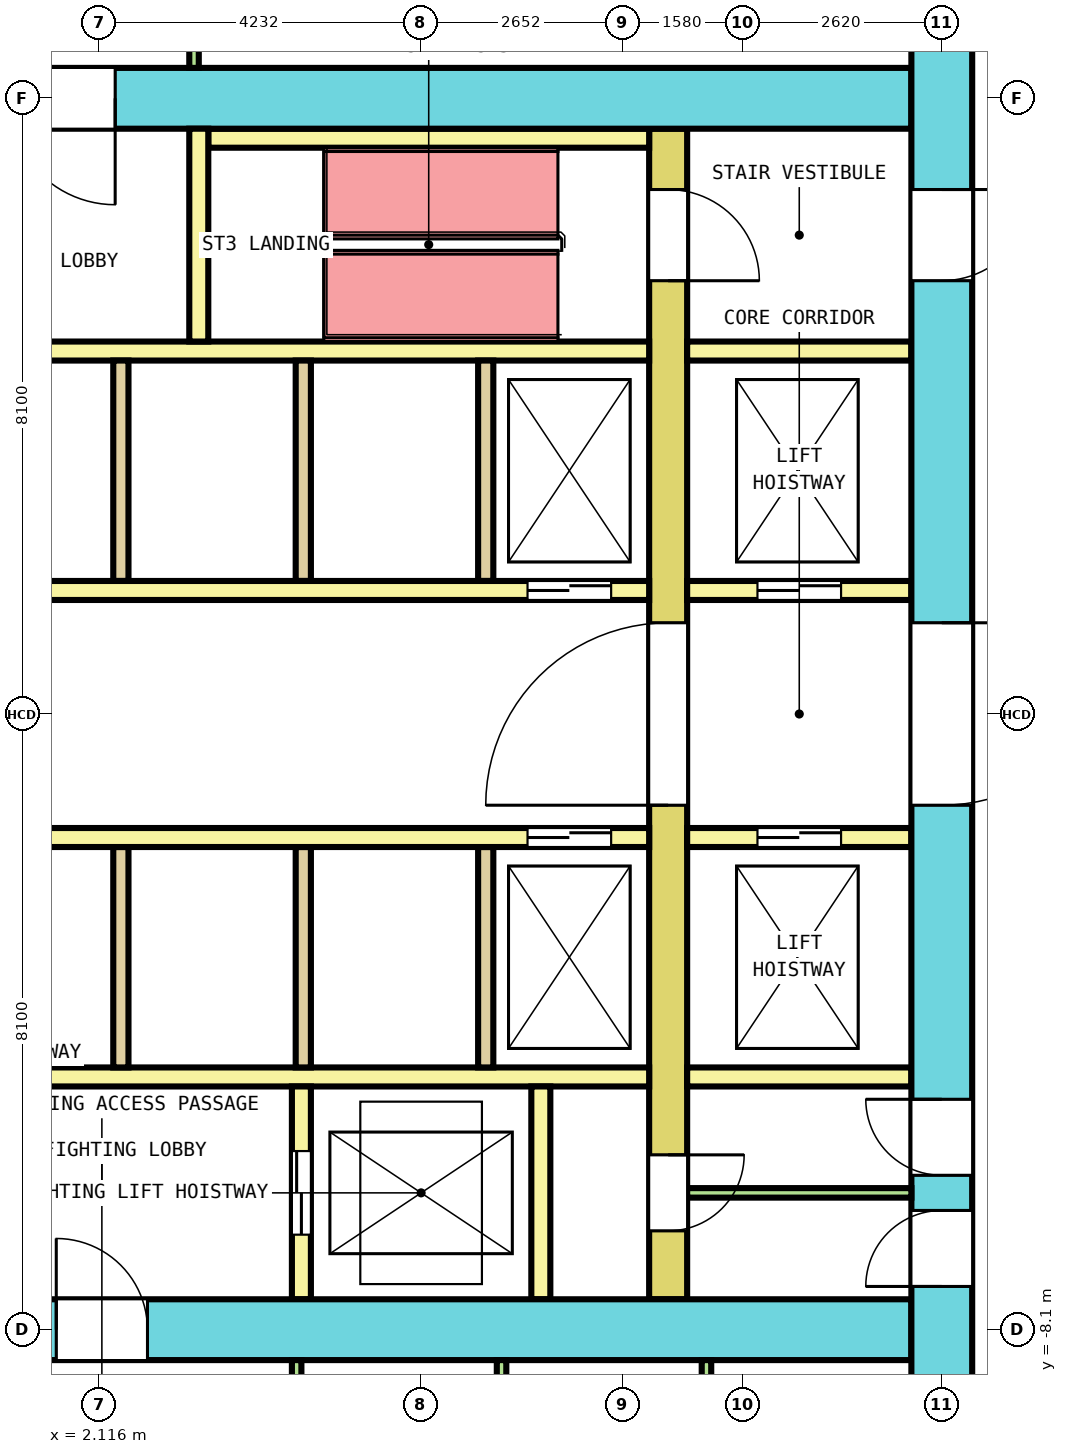
"""IFC4 building model, lengths in metres.
Left out: names, types, materials, properties, quantities, classifications, styles, units other than length and angle.
Written with IfcOpenShell. Run it as: python <this file> out.ifc"""

import sys

from ifc_helpers import new_model, si_unit, direction, frame, frame_2d, origin, place, context, subcontext, project, spatial, rectangle, extrude, element, fill, save


model = new_model("IFC4")
c1 = context("Model", 3, precision=1e-05, world=origin(), true_north=direction((0.0, 1.0)))
c2 = subcontext(c1, "Body", "Model", "MODEL_VIEW")
j1 = project(units=[si_unit("LENGTHUNIT", "METRE"), si_unit("PLANEANGLEUNIT", "RADIAN")], contexts=[c1])
p1 = place(None, origin())
s1 = spatial("IfcSite", under=j1, at=p1, CompositionType="ELEMENT")
p2 = place(p1, origin())
s2 = spatial("IfcBuilding", under=s1, at=p2, CompositionType="ELEMENT")
p3 = place(p2, frame((0.0, 0.0, 80.8)))
s3 = spatial("IfcBuildingStorey", under=s2, at=p3, CompositionType="ELEMENT", Elevation=80.8)
p4 = place(p3, frame((13.2, -10.4, 0.0), z_axis=(0.0, 0.0, 1.0), x_axis=(0.0, 1.0, 0.0)))
e1 = element("IfcWall", 1, at=p4, inside=s3, PredefinedType="SHEAR", context=c2, shape_type="SweptSolid", body=[
    extrude(rectangle(XDim=20.8, YDim=0.8, at=frame_2d((10.4, 0.0))), origin(), (0.0, 0.0, 1.0), 4.1),
])
p5 = place(p4, frame((9.2, 0.0, 0.0)))
e2 = element("IfcOpeningElement", 2, at=p5, cuts=e1, PredefinedType="OPENING", context=c2, shape_type="SweptSolid", body=[
    extrude(rectangle(XDim=2.4, YDim=2.1, at=frame_2d((1.2, 1.05))), frame((0.0, 0.41, 0.0), z_axis=(0.0, -1.0, 0.0), x_axis=(1.0, 0.0, 0.0)), (0.0, 0.0, 1.0), 0.82),
])
p6 = place(p4, frame((16.1, 0.0, 0.0)))
e3 = element("IfcOpeningElement", 3, at=p6, cuts=e1, PredefinedType="OPENING", context=c2, shape_type="SweptSolid", body=[
    extrude(rectangle(XDim=1.2, YDim=2.1, at=frame_2d((0.6, 1.05))), frame((0.0, 0.41, 0.0), z_axis=(0.0, -1.0, 0.0), x_axis=(1.0, 0.0, 0.0)), (0.0, 0.0, 1.0), 0.82),
])
p7 = place(p4, frame((2.869, 0.0, 0.0)))
e4 = element("IfcOpeningElement", 4, at=p7, cuts=e1, PredefinedType="OPENING", context=c2, shape_type="SweptSolid", body=[
    extrude(rectangle(XDim=1.0, YDim=2.1, at=frame_2d((0.5, 1.05))), frame((0.0, 0.41, 0.0), z_axis=(0.0, -1.0, 0.0), x_axis=(1.0, 0.0, 0.0)), (0.0, 0.0, 1.0), 0.82),
])
p8 = place(p4, frame((4.331, 0.0, 0.0)))
e5 = element("IfcOpeningElement", 5, at=p8, cuts=e1, PredefinedType="OPENING", context=c2, shape_type="SweptSolid", body=[
    extrude(rectangle(XDim=1.0, YDim=2.1, at=frame_2d((0.5, 1.05))), frame((0.0, 0.41, 0.0), z_axis=(0.0, -1.0, 0.0), x_axis=(1.0, 0.0, 0.0)), (0.0, 0.0, 1.0), 0.82),
])
p9 = place(p3, frame((-12.8, 8.1, 0.0), z_axis=(0.0, 0.0, 1.0), x_axis=(1.0, 0.0, 0.0)))
e6 = element("IfcWall", 6, at=p9, inside=s3, PredefinedType="SHEAR", context=c2, shape_type="SweptSolid", body=[
    extrude(rectangle(XDim=25.6, YDim=0.8, at=frame_2d((12.8, 0.0))), origin(), (0.0, 0.0, 1.0), 4.1),
])
p10 = place(p9, frame((13.725, 0.0, 0.0)))
e7 = element("IfcOpeningElement", 7, at=p10, cuts=e6, PredefinedType="OPENING", context=c2, shape_type="SweptSolid", body=[
    extrude(rectangle(XDim=1.4, YDim=2.1, at=frame_2d((0.7, 1.05))), frame((0.0, 0.41, 0.0), z_axis=(0.0, -1.0, 0.0), x_axis=(1.0, 0.0, 0.0)), (0.0, 0.0, 1.0), 0.82),
])
p11 = place(p3, frame((-12.8, -8.1, 0.0), z_axis=(0.0, 0.0, 1.0), x_axis=(1.0, 0.0, 0.0)))
e8 = element("IfcWall", 8, at=p11, inside=s3, PredefinedType="SHEAR", context=c2, shape_type="SweptSolid", body=[
    extrude(rectangle(XDim=25.6, YDim=0.8, at=frame_2d((12.8, 0.0))), origin(), (0.0, 0.0, 1.0), 4.1),
])
p12 = place(p11, frame((14.35, 0.0, 0.0)))
e9 = element("IfcOpeningElement", 9, at=p12, cuts=e8, PredefinedType="OPENING", context=c2, shape_type="SweptSolid", body=[
    extrude(rectangle(XDim=1.2, YDim=2.1, at=frame_2d((0.6, 1.05))), frame((0.0, 0.41, 0.0), z_axis=(0.0, -1.0, 0.0), x_axis=(1.0, 0.0, 0.0)), (0.0, 0.0, 1.0), 0.82),
])
p13 = place(p3, frame((9.6, -7.7, 0.0), z_axis=(0.0, 0.0, 1.0), x_axis=(0.0, 1.0, 0.0)))
e10 = element("IfcWall", 10, at=p13, inside=s3, PredefinedType="SHEAR", context=c2, shape_type="SweptSolid", body=[
    extrude(rectangle(XDim=15.4, YDim=0.5, at=frame_2d((7.7, 0.0))), origin(), (0.0, 0.0, 1.0), 4.1),
])
p14 = place(p13, frame((6.5, 0.0, 0.0)))
e11 = element("IfcOpeningElement", 11, at=p14, cuts=e10, PredefinedType="OPENING", context=c2, shape_type="SweptSolid", body=[
    extrude(rectangle(XDim=2.4, YDim=2.1, at=frame_2d((1.2, 1.05))), frame((0.0, 0.26, 0.0), z_axis=(0.0, -1.0, 0.0), x_axis=(1.0, 0.0, 0.0)), (0.0, 0.0, 1.0), 0.52),
])
p15 = place(p13, frame((13.4, 0.0, 0.0)))
e12 = element("IfcOpeningElement", 12, at=p15, cuts=e10, PredefinedType="OPENING", context=c2, shape_type="SweptSolid", body=[
    extrude(rectangle(XDim=1.2, YDim=2.1, at=frame_2d((0.6, 1.05))), frame((0.0, 0.26, 0.0), z_axis=(0.0, -1.0, 0.0), x_axis=(1.0, 0.0, 0.0)), (0.0, 0.0, 1.0), 0.52),
])
p16 = place(p13, frame((0.9, 0.0, 0.0)))
e13 = element("IfcOpeningElement", 13, at=p16, cuts=e10, PredefinedType="OPENING", context=c2, shape_type="SweptSolid", body=[
    extrude(rectangle(XDim=1.0, YDim=2.1, at=frame_2d((0.5, 1.05))), frame((0.0, 0.26, 0.0), z_axis=(0.0, -1.0, 0.0), x_axis=(1.0, 0.0, 0.0)), (0.0, 0.0, 1.0), 0.52),
])
p17 = place(p3, frame((-9.35, 1.625, 0.0), z_axis=(0.0, 0.0, 1.0), x_axis=(1.0, 0.0, 0.0)))
e14 = element("IfcWall", 14, at=p17, inside=s3, PredefinedType="SOLIDWALL", context=c2, shape_type="SweptSolid", body=[
    extrude(rectangle(XDim=18.7, YDim=0.25, at=frame_2d((9.35, 0.0))), origin(), (0.0, 0.0, 1.0), 4.1),
])
p18 = place(p17, frame((0.5, 0.0, 0.0)))
e15 = element("IfcOpeningElement", 15, at=p18, cuts=e14, PredefinedType="OPENING", context=c2, shape_type="SweptSolid", body=[
    extrude(rectangle(XDim=1.1, YDim=2.1, at=frame_2d((0.55, 1.05))), frame((0.0, 0.135, 0.0), z_axis=(0.0, -1.0, 0.0), x_axis=(1.0, 0.0, 0.0)), (0.0, 0.0, 1.0), 0.27),
])
p19 = place(p17, frame((17.1, 0.0, 0.0)))
e16 = element("IfcOpeningElement", 16, at=p19, cuts=e14, PredefinedType="OPENING", context=c2, shape_type="SweptSolid", body=[
    extrude(rectangle(XDim=1.1, YDim=2.1, at=frame_2d((0.55, 1.05))), frame((0.0, 0.135, 0.0), z_axis=(0.0, -1.0, 0.0), x_axis=(1.0, 0.0, 0.0)), (0.0, 0.0, 1.0), 0.27),
])
p20 = place(p3, frame((9.85, 1.625, 0.0), z_axis=(0.0, 0.0, 1.0), x_axis=(1.0, 0.0, 0.0)))
e17 = element("IfcWall", 17, at=p20, inside=s3, PredefinedType="SOLIDWALL", context=c2, shape_type="SweptSolid", body=[
    extrude(rectangle(XDim=2.95, YDim=0.25, at=frame_2d((1.475, 0.0))), origin(), (0.0, 0.0, 1.0), 4.1),
])
p21 = place(p20, frame((0.925, 0.0, 0.0)))
e18 = element("IfcOpeningElement", 18, at=p21, cuts=e17, PredefinedType="OPENING", context=c2, shape_type="SweptSolid", body=[
    extrude(rectangle(XDim=1.1, YDim=2.1, at=frame_2d((0.55, 1.05))), frame((0.0, 0.135, 0.0), z_axis=(0.0, -1.0, 0.0), x_axis=(1.0, 0.0, 0.0)), (0.0, 0.0, 1.0), 0.27),
])
p22 = place(p3, frame((-9.35, 4.775, 0.0), z_axis=(0.0, 0.0, 1.0), x_axis=(1.0, 0.0, 0.0)))
e19 = element("IfcWall", 19, at=p22, inside=s3, PredefinedType="SOLIDWALL", context=c2, shape_type="SweptSolid", body=[
    extrude(rectangle(XDim=18.7, YDim=0.25, at=frame_2d((9.35, 0.0))), origin(), (0.0, 0.0, 1.0), 4.1),
])
p23 = place(p3, frame((9.85, 4.775, 0.0), z_axis=(0.0, 0.0, 1.0), x_axis=(1.0, 0.0, 0.0)))
e20 = element("IfcWall", 20, at=p23, inside=s3, PredefinedType="SOLIDWALL", context=c2, shape_type="SweptSolid", body=[
    extrude(rectangle(XDim=2.95, YDim=0.25, at=frame_2d((1.475, 0.0))), origin(), (0.0, 0.0, 1.0), 4.1),
])
for number, where, z_axis, x_axis in (
    (21, (2.4, 1.75, 0.0), (0.0, 0.0, 1.0), (0.0, 1.0, 0.0)),
    (22, (4.8, 1.75, 0.0), (0.0, 0.0, 1.0), (0.0, 1.0, 0.0)),
    (23, (7.2, 1.75, 0.0), (0.0, 0.0, 1.0), (0.0, 1.0, 0.0)),
):
    element("IfcWall", number, at=place(p3, frame(where, z_axis=z_axis, x_axis=x_axis)), inside=s3, PredefinedType="SOLIDWALL", context=c2, shape_type="SweptSolid", body=[
        extrude(rectangle(XDim=2.9, YDim=0.2, at=frame_2d((1.45, 0.0))), origin(), (0.0, 0.0, 1.0), 4.1),
    ])
p24 = place(p3, frame((-9.35, -1.625, 0.0), z_axis=(0.0, 0.0, 1.0), x_axis=(1.0, 0.0, 0.0)))
e24 = element("IfcWall", 24, at=p24, inside=s3, PredefinedType="SOLIDWALL", context=c2, shape_type="SweptSolid", body=[
    extrude(rectangle(XDim=18.7, YDim=0.25, at=frame_2d((9.35, 0.0))), origin(), (0.0, 0.0, 1.0), 4.1),
])
p25 = place(p24, frame((0.5, 0.0, 0.0)))
e25 = element("IfcOpeningElement", 25, at=p25, cuts=e24, PredefinedType="OPENING", context=c2, shape_type="SweptSolid", body=[
    extrude(rectangle(XDim=1.1, YDim=2.1, at=frame_2d((0.55, 1.05))), frame((0.0, 0.135, 0.0), z_axis=(0.0, -1.0, 0.0), x_axis=(1.0, 0.0, 0.0)), (0.0, 0.0, 1.0), 0.27),
])
p26 = place(p24, frame((17.1, 0.0, 0.0)))
e26 = element("IfcOpeningElement", 26, at=p26, cuts=e24, PredefinedType="OPENING", context=c2, shape_type="SweptSolid", body=[
    extrude(rectangle(XDim=1.1, YDim=2.1, at=frame_2d((0.55, 1.05))), frame((0.0, 0.135, 0.0), z_axis=(0.0, -1.0, 0.0), x_axis=(1.0, 0.0, 0.0)), (0.0, 0.0, 1.0), 0.27),
])
p27 = place(p3, frame((9.85, -1.625, 0.0), z_axis=(0.0, 0.0, 1.0), x_axis=(1.0, 0.0, 0.0)))
e27 = element("IfcWall", 27, at=p27, inside=s3, PredefinedType="SOLIDWALL", context=c2, shape_type="SweptSolid", body=[
    extrude(rectangle(XDim=2.95, YDim=0.25, at=frame_2d((1.475, 0.0))), origin(), (0.0, 0.0, 1.0), 4.1),
])
p28 = place(p27, frame((0.925, 0.0, 0.0)))
e28 = element("IfcOpeningElement", 28, at=p28, cuts=e27, PredefinedType="OPENING", context=c2, shape_type="SweptSolid", body=[
    extrude(rectangle(XDim=1.1, YDim=2.1, at=frame_2d((0.55, 1.05))), frame((0.0, 0.135, 0.0), z_axis=(0.0, -1.0, 0.0), x_axis=(1.0, 0.0, 0.0)), (0.0, 0.0, 1.0), 0.27),
])
p29 = place(p3, frame((-9.35, -4.775, 0.0), z_axis=(0.0, 0.0, 1.0), x_axis=(1.0, 0.0, 0.0)))
e29 = element("IfcWall", 29, at=p29, inside=s3, PredefinedType="SOLIDWALL", context=c2, shape_type="SweptSolid", body=[
    extrude(rectangle(XDim=18.7, YDim=0.25, at=frame_2d((9.35, 0.0))), origin(), (0.0, 0.0, 1.0), 4.1),
])
p30 = place(p3, frame((9.85, -4.775, 0.0), z_axis=(0.0, 0.0, 1.0), x_axis=(1.0, 0.0, 0.0)))
e30 = element("IfcWall", 30, at=p30, inside=s3, PredefinedType="SOLIDWALL", context=c2, shape_type="SweptSolid", body=[
    extrude(rectangle(XDim=2.95, YDim=0.25, at=frame_2d((1.475, 0.0))), origin(), (0.0, 0.0, 1.0), 4.1),
])
for number, where, z_axis, x_axis in (
    (31, (2.4, -4.65, 0.0), (0.0, 0.0, 1.0), (0.0, 1.0, 0.0)),
    (32, (4.8, -4.65, 0.0), (0.0, 0.0, 1.0), (0.0, 1.0, 0.0)),
    (33, (7.2, -4.65, 0.0), (0.0, 0.0, 1.0), (0.0, 1.0, 0.0)),
):
    element("IfcWall", number, at=place(p3, frame(where, z_axis=z_axis, x_axis=x_axis)), inside=s3, PredefinedType="SOLIDWALL", context=c2, shape_type="SweptSolid", body=[
        extrude(rectangle(XDim=2.9, YDim=0.2, at=frame_2d((1.45, 0.0))), origin(), (0.0, 0.0, 1.0), 4.1),
    ])
p31 = place(p3, frame((3.55, 7.575, 0.0), z_axis=(0.0, 0.0, 1.0), x_axis=(1.0, 0.0, 0.0)))
e34 = element("IfcWall", 34, at=p31, inside=s3, PredefinedType="SOLIDWALL", context=c2, shape_type="SweptSolid", body=[
    extrude(rectangle(XDim=5.8, YDim=0.25, at=frame_2d((2.9, 0.0))), origin(), (0.0, 0.0, 1.0), 4.1),
])
p32 = place(p3, frame((3.425, 4.9, 0.0), z_axis=(0.0, 0.0, 1.0), x_axis=(0.0, 1.0, 0.0)))
e35 = element("IfcWall", 35, at=p32, inside=s3, PredefinedType="SOLIDWALL", context=c2, shape_type="SweptSolid", body=[
    extrude(rectangle(XDim=2.8, YDim=0.25, at=frame_2d((1.4, 0.0))), origin(), (0.0, 0.0, 1.0), 4.1),
])
p33 = place(p3, frame((4.775, -7.7, 0.0), z_axis=(0.0, 0.0, 1.0), x_axis=(0.0, 1.0, 0.0)))
e36 = element("IfcWall", 36, at=p33, inside=s3, PredefinedType="SOLIDWALL", context=c2, shape_type="SweptSolid", body=[
    extrude(rectangle(XDim=2.8, YDim=0.25, at=frame_2d((1.4, 0.0))), origin(), (0.0, 0.0, 1.0), 4.1),
])
p34 = place(p33, frame((0.85, 0.0, 0.0)))
e37 = element("IfcOpeningElement", 37, at=p34, cuts=e36, PredefinedType="OPENING", context=c2, shape_type="SweptSolid", body=[
    extrude(rectangle(XDim=1.1, YDim=2.1, at=frame_2d((0.55, 1.05))), frame((0.0, 0.135, 0.0), z_axis=(0.0, -1.0, 0.0), x_axis=(1.0, 0.0, 0.0)), (0.0, 0.0, 1.0), 0.27),
])
p35 = place(p3, frame((7.925, -7.7, 0.0), z_axis=(0.0, 0.0, 1.0), x_axis=(0.0, 1.0, 0.0)))
e38 = element("IfcWall", 38, at=p35, inside=s3, PredefinedType="SOLIDWALL", context=c2, shape_type="SweptSolid", body=[
    extrude(rectangle(XDim=2.8, YDim=0.25, at=frame_2d((1.4, 0.0))), origin(), (0.0, 0.0, 1.0), 4.1),
])
p36 = place(p3, frame((9.85, -6.3, 0.0), z_axis=(0.0, 0.0, 1.0), x_axis=(1.0, 0.0, 0.0)))
e39 = element("IfcWall", 39, at=p36, inside=s3, PredefinedType="PARTITIONING", context=c2, shape_type="SweptSolid", body=[
    extrude(rectangle(XDim=2.95, YDim=0.125, at=frame_2d((1.475, 0.0))), origin(), (0.0, 0.0, 1.0), 4.1),
])
for number, where, z_axis, x_axis in (
    (40, (3.363, 8.5, 0.0), (0.0, 0.0, 1.0), (0.0, 1.0, 0.0)),
    (41, (4.712, -10.4, 0.0), (0.0, 0.0, 1.0), (0.0, 1.0, 0.0)),
    (42, (7.408, -10.4, 0.0), (0.0, 0.0, 1.0), (0.0, 1.0, 0.0)),
    (43, (10.104, -10.4, 0.0), (0.0, 0.0, 1.0), (0.0, 1.0, 0.0)),
):
    element("IfcWall", number, at=place(p3, frame(where, z_axis=z_axis, x_axis=x_axis)), inside=s3, PredefinedType="PARTITIONING", context=c2, shape_type="SweptSolid", body=[
        extrude(rectangle(XDim=1.9, YDim=0.125, at=frame_2d((0.95, 0.0))), origin(), (0.0, 0.0, 1.0), 4.1),
    ])
p37 = place(p19, origin())
e44 = element("IfcDoor", 44, at=p37, inside=s3, OperationType="DOUBLE_DOOR_SLIDING", PredefinedType="DOOR", context=c2, shape_type="SweptSolid", body=[
    extrude(rectangle(XDim=1.1, YDim=2.1, at=frame_2d((0.55, 1.05))), frame((0.0, 0.075, 0.0), z_axis=(0.0, -1.0, 0.0), x_axis=(1.0, 0.0, 0.0)), (0.0, 0.0, 1.0), 0.15),
])
fill(e16, e44)
p38 = place(p21, origin())
e45 = element("IfcDoor", 45, at=p38, inside=s3, OperationType="DOUBLE_DOOR_SLIDING", PredefinedType="DOOR", context=c2, shape_type="SweptSolid", body=[
    extrude(rectangle(XDim=1.1, YDim=2.1, at=frame_2d((0.55, 1.05))), frame((0.0, 0.075, 0.0), z_axis=(0.0, -1.0, 0.0), x_axis=(1.0, 0.0, 0.0)), (0.0, 0.0, 1.0), 0.15),
])
fill(e18, e45)
p39 = place(p26, origin())
e46 = element("IfcDoor", 46, at=p39, inside=s3, OperationType="DOUBLE_DOOR_SLIDING", PredefinedType="DOOR", context=c2, shape_type="SweptSolid", body=[
    extrude(rectangle(XDim=1.1, YDim=2.1, at=frame_2d((0.55, 1.05))), frame((0.0, 0.075, 0.0), z_axis=(0.0, -1.0, 0.0), x_axis=(1.0, 0.0, 0.0)), (0.0, 0.0, 1.0), 0.15),
])
fill(e26, e46)
p40 = place(p28, origin())
e47 = element("IfcDoor", 47, at=p40, inside=s3, OperationType="DOUBLE_DOOR_SLIDING", PredefinedType="DOOR", context=c2, shape_type="SweptSolid", body=[
    extrude(rectangle(XDim=1.1, YDim=2.1, at=frame_2d((0.55, 1.05))), frame((0.0, 0.075, 0.0), z_axis=(0.0, -1.0, 0.0), x_axis=(1.0, 0.0, 0.0)), (0.0, 0.0, 1.0), 0.15),
])
fill(e28, e47)
p41 = place(p34, origin())
e48 = element("IfcDoor", 48, at=p41, inside=s3, OperationType="DOUBLE_DOOR_SLIDING", PredefinedType="DOOR", context=c2, shape_type="SweptSolid", body=[
    extrude(rectangle(XDim=1.1, YDim=2.1, at=frame_2d((0.55, 1.05))), frame((0.0, 0.075, 0.0), z_axis=(0.0, -1.0, 0.0), x_axis=(1.0, 0.0, 0.0)), (0.0, 0.0, 1.0), 0.15),
])
fill(e37, e48)
p42 = place(p14, origin())
e49 = element("IfcDoor", 49, at=p42, inside=s3, OperationType="DOUBLE_DOOR_SINGLE_SWING", PredefinedType="DOOR", context=c2, shape_type="SweptSolid", body=[
    extrude(rectangle(XDim=2.4, YDim=2.1, at=frame_2d((1.2, 1.05))), frame((0.0, 0.2, 0.0), z_axis=(0.0, -1.0, 0.0), x_axis=(1.0, 0.0, 0.0)), (0.0, 0.0, 1.0), 0.4),
])
fill(e11, e49)
p43 = place(p5, origin())
e50 = element("IfcDoor", 50, at=p43, inside=s3, OperationType="DOUBLE_DOOR_SINGLE_SWING", PredefinedType="DOOR", context=c2, shape_type="SweptSolid", body=[
    extrude(rectangle(XDim=2.4, YDim=2.1, at=frame_2d((1.2, 1.05))), frame((0.0, 0.3, 0.0), z_axis=(0.0, -1.0, 0.0), x_axis=(1.0, 0.0, 0.0)), (0.0, 0.0, 1.0), 0.6),
])
fill(e2, e50)
p44 = place(p15, origin())
e51 = element("IfcDoor", 51, at=p44, inside=s3, OperationType="SINGLE_SWING_LEFT", PredefinedType="DOOR", context=c2, shape_type="SweptSolid", body=[
    extrude(rectangle(XDim=1.2, YDim=2.1, at=frame_2d((0.6, 1.05))), frame((0.0, 0.2, 0.0), z_axis=(0.0, -1.0, 0.0), x_axis=(1.0, 0.0, 0.0)), (0.0, 0.0, 1.0), 0.4),
])
fill(e12, e51)
p45 = place(p6, origin())
e52 = element("IfcDoor", 52, at=p45, inside=s3, OperationType="SINGLE_SWING_RIGHT", PredefinedType="DOOR", context=c2, shape_type="SweptSolid", body=[
    extrude(rectangle(XDim=1.2, YDim=2.1, at=frame_2d((0.6, 1.05))), frame((0.0, 0.3, 0.0), z_axis=(0.0, -1.0, 0.0), x_axis=(1.0, 0.0, 0.0)), (0.0, 0.0, 1.0), 0.6),
])
fill(e3, e52)
p46 = place(p12, origin())
e53 = element("IfcDoor", 53, at=p46, inside=s3, OperationType="SINGLE_SWING_LEFT", PredefinedType="DOOR", context=c2, shape_type="SweptSolid", body=[
    extrude(rectangle(XDim=1.2, YDim=2.1, at=frame_2d((0.6, 1.05))), frame((0.0, 0.3, 0.0), z_axis=(0.0, -1.0, 0.0), x_axis=(1.0, 0.0, 0.0)), (0.0, 0.0, 1.0), 0.6),
])
fill(e9, e53)
p47 = place(p10, origin())
e54 = element("IfcDoor", 54, at=p47, inside=s3, OperationType="DOUBLE_DOOR_SINGLE_SWING", PredefinedType="DOOR", context=c2, shape_type="SweptSolid", body=[
    extrude(rectangle(XDim=1.4, YDim=2.1, at=frame_2d((0.7, 1.05))), frame((0.0, 0.3, 0.0), z_axis=(0.0, -1.0, 0.0), x_axis=(1.0, 0.0, 0.0)), (0.0, 0.0, 1.0), 0.6),
])
fill(e7, e54)
p48 = place(p16, origin())
e55 = element("IfcDoor", 55, at=p48, inside=s3, OperationType="SINGLE_SWING_LEFT", PredefinedType="DOOR", context=c2, shape_type="SweptSolid", body=[
    extrude(rectangle(XDim=1.0, YDim=2.1, at=frame_2d((0.5, 1.05))), frame((0.0, 0.2, 0.0), z_axis=(0.0, -1.0, 0.0), x_axis=(1.0, 0.0, 0.0)), (0.0, 0.0, 1.0), 0.4),
])
fill(e13, e55)
p49 = place(p7, origin())
e56 = element("IfcDoor", 56, at=p49, inside=s3, OperationType="SINGLE_SWING_RIGHT", PredefinedType="DOOR", context=c2, shape_type="SweptSolid", body=[
    extrude(rectangle(XDim=1.0, YDim=2.1, at=frame_2d((0.5, 1.05))), frame((0.0, 0.3, 0.0), z_axis=(0.0, -1.0, 0.0), x_axis=(1.0, 0.0, 0.0)), (0.0, 0.0, 1.0), 0.6),
])
fill(e4, e56)
p50 = place(p8, origin())
e57 = element("IfcDoor", 57, at=p50, inside=s3, OperationType="SINGLE_SWING_LEFT", PredefinedType="DOOR", context=c2, shape_type="SweptSolid", body=[
    extrude(rectangle(XDim=1.0, YDim=2.1, at=frame_2d((0.5, 1.05))), frame((0.0, 0.3, 0.0), z_axis=(0.0, -1.0, 0.0), x_axis=(1.0, 0.0, 0.0)), (0.0, 0.0, 1.0), 0.6),
])
fill(e5, e57)
save(model, sys.argv[1])
